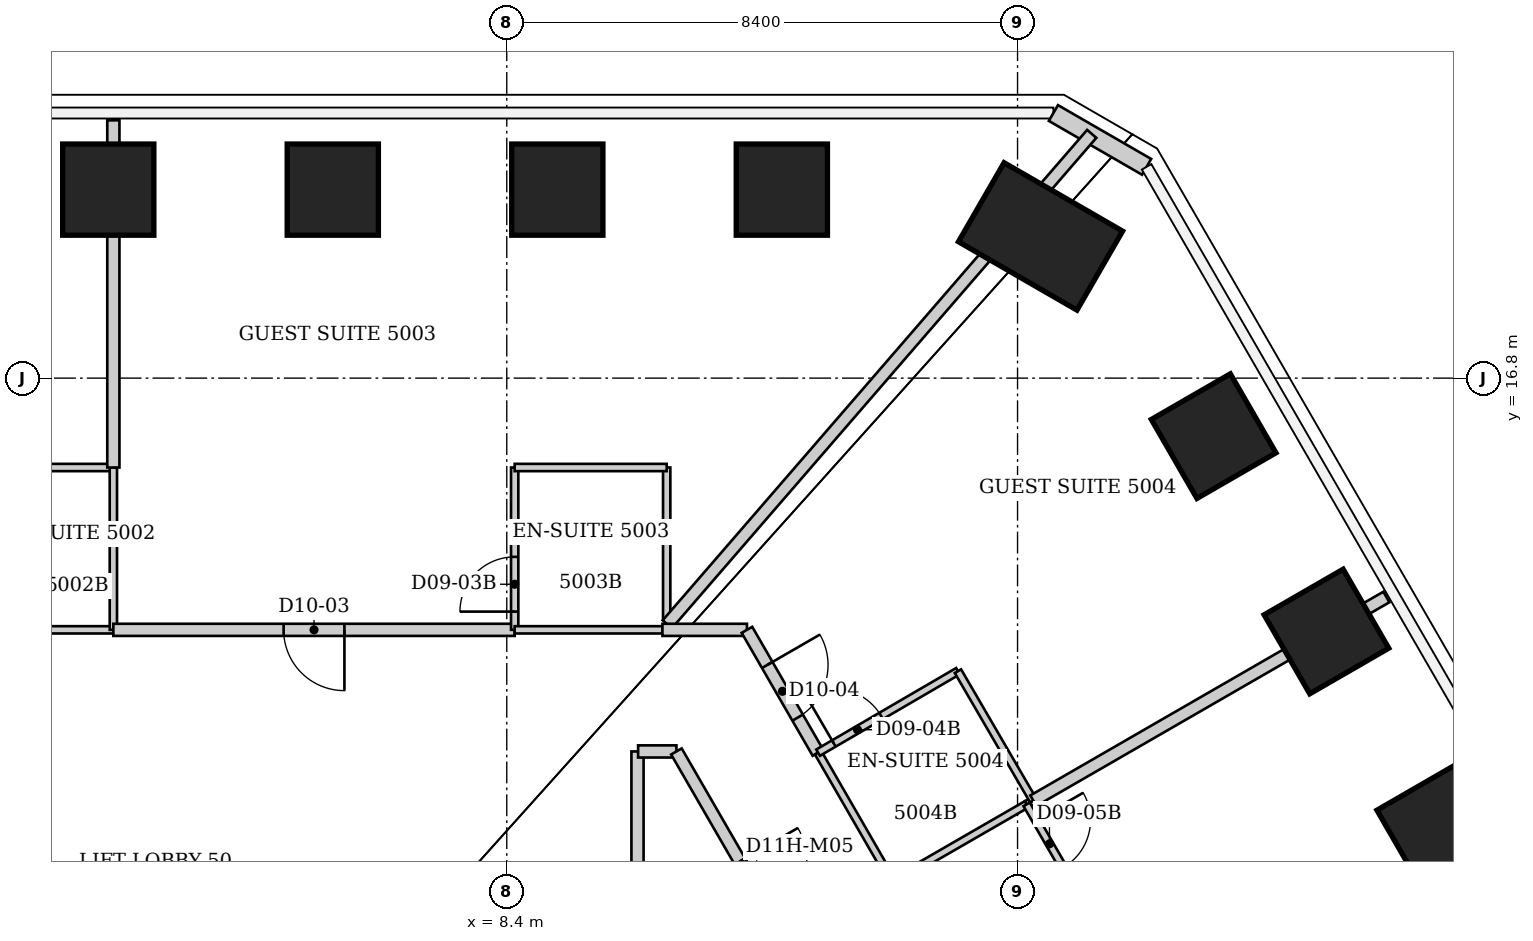
"""IFC4 building model, lengths in metres.
Left out: names, types, materials, properties, quantities, classifications, styles, units other than length and angle.
Written with IfcOpenShell. Run it as: python <this file> out.ifc"""

import sys

from ifc_helpers import new_model, si_unit, direction, frame, frame_2d, origin, origin_2d, place, context, subcontext, project, spatial, rectangle, extrude, element, fill, save


model = new_model("IFC4")
c1 = context("Model", 3, precision=1e-05, world=origin(), true_north=direction((0.0, 1.0)))
c2 = subcontext(c1, "Body", "Model", "MODEL_VIEW")
j1 = project(units=[si_unit("LENGTHUNIT", "METRE"), si_unit("PLANEANGLEUNIT", "RADIAN")], contexts=[c1])
p1 = place(None, origin())
s1 = spatial("IfcSite", under=j1, at=p1, CompositionType="ELEMENT")
p2 = place(p1, origin())
s2 = spatial("IfcBuilding", under=s1, at=p2, CompositionType="ELEMENT")
p3 = place(p2, frame((0.0, 0.0, 202.2)))
s3 = spatial("IfcBuildingStorey", under=s2, at=p3, CompositionType="ELEMENT", Elevation=202.2)
for number, where, z_axis, x_axis in (
    (1, (1.846, 19.9, 0.0), (0.0, 0.0, 1.0), (0.0, 1.0, 0.0)),
    (2, (5.539, 19.9, 0.0), (0.0, 0.0, 1.0), (0.0, 1.0, 0.0)),
    (3, (9.231, 19.9, 0.0), (0.0, 0.0, 1.0), (0.0, 1.0, 0.0)),
    (4, (12.924, 19.9, 0.0), (0.0, 0.0, 1.0), (0.0, 1.0, 0.0)),
):
    element("IfcColumn", number, at=place(p3, frame(where, z_axis=z_axis, x_axis=x_axis)), inside=s3, PredefinedType="COLUMN", context=c2, shape_type="SweptSolid", body=[
        extrude(rectangle(XDim=1.5, YDim=1.5, at=origin_2d()), origin(), (0.0, 0.0, 1.0), 3.8),
    ])
p4 = place(p3, frame((17.178, 19.131, 0.0), z_axis=(0.0, 0.0, 1.0), x_axis=(0.5, 0.866025403784, 0.0)))
e5 = element("IfcColumn", 5, at=p4, inside=s3, PredefinedType="COLUMN", context=c2, shape_type="SweptSolid", body=[
    extrude(rectangle(XDim=1.5, YDim=2.25, at=origin_2d()), origin(), (0.0, 0.0, 1.0), 3.8),
])
for number, where, z_axis, x_axis in (
    (6, (20.025, 15.846, 0.0), (0.0, 0.0, 1.0), (0.866, 0.5, 0.0)),
    (7, (21.88, 12.633, 0.0), (0.0, 0.0, 1.0), (0.866, 0.5, 0.0)),
    (8, (23.735, 9.419, 0.0), (0.0, 0.0, 1.0), (0.866, 0.5, 0.0)),
):
    element("IfcColumn", number, at=place(p3, frame(where, z_axis=z_axis, x_axis=x_axis)), inside=s3, PredefinedType="COLUMN", context=c2, shape_type="SweptSolid", body=[
        extrude(rectangle(XDim=1.5, YDim=1.5, at=origin_2d()), origin(), (0.0, 0.0, 1.0), 3.8),
    ])
p5 = place(p3, frame((17.39, 21.16, 0.0), z_axis=(0.0, 0.0, 1.0), x_axis=(0.866036293601, -0.499981137809, 0.0)))
e9 = element("IfcWall", 9, at=p5, inside=s3, PredefinedType="SOLIDWALL", context=c2, shape_type="SweptSolid", body=[
    extrude(rectangle(XDim=1.77, YDim=0.3, at=frame_2d((0.885, 0.0))), origin(), (0.0, 0.0, 1.0), 3.64),
])
for number, where, z_axis, x_axis in (
    (10, (1.93, 12.66, 0.0), (0.0, 0.0, 1.0), (-1.0, 0.0, 0.0)),
    (11, (1.93, 15.33, 0.0), (0.0, 0.0, 1.0), (-1.0, 0.0, 0.0)),
):
    element("IfcWall", number, at=place(p3, frame(where, z_axis=z_axis, x_axis=x_axis)), inside=s3, PredefinedType="PARTITIONING", context=c2, shape_type="SweptSolid", body=[
        extrude(rectangle(XDim=2.45, YDim=0.12, at=frame_2d((1.225, 0.0))), origin(), (0.0, 0.0, 1.0), 3.64),
    ])
p6 = place(p3, frame((1.93, 15.33, 0.0), z_axis=(0.0, 0.0, 1.0), x_axis=(0.0, -1.0, 0.0)))
e12 = element("IfcWall", 12, at=p6, inside=s3, PredefinedType="PARTITIONING", context=c2, shape_type="SweptSolid", body=[
    extrude(rectangle(XDim=2.67, YDim=0.12, at=frame_2d((1.335, 0.0))), origin(), (0.0, 0.0, 1.0), 3.023),
])
p7 = place(p3, frame((1.93, 21.04, 0.0), z_axis=(0.0, 0.0, 1.0), x_axis=(0.0, -1.0, 0.0)))
e13 = element("IfcWall", 13, at=p7, inside=s3, PredefinedType="PARTITIONING", context=c2, shape_type="SweptSolid", body=[
    extrude(rectangle(XDim=5.71, YDim=0.2, at=frame_2d((2.855, 0.0))), origin(), (0.0, 0.0, 1.0), 3.023),
])
p8 = place(p3, frame((8.53, 12.66, 0.0), z_axis=(0.0, 0.0, 1.0), x_axis=(-1.0, 0.0, 0.0)))
e14 = element("IfcWall", 14, at=p8, inside=s3, PredefinedType="PARTITIONING", context=c2, shape_type="SweptSolid", body=[
    extrude(rectangle(XDim=6.6, YDim=0.2, at=frame_2d((3.3, 0.0))), origin(), (0.0, 0.0, 1.0), 3.64),
])
p9 = place(p8, frame((2.8, 0.0, 0.0)))
e15 = element("IfcOpeningElement", 15, at=p9, cuts=e14, PredefinedType="OPENING", context=c2, shape_type="SweptSolid", body=[
    extrude(rectangle(XDim=1.0, YDim=2.13, at=frame_2d((0.5, 1.065))), frame((0.0, 0.1, 0.0), z_axis=(0.0, -1.0, 0.0), x_axis=(1.0, 0.0, 0.0)), (0.0, 0.0, 1.0), 0.2),
])
p10 = place(p3, frame((8.53, 15.33, 0.0), z_axis=(0.0, 0.0, 1.0), x_axis=(0.0, -1.0, 0.0)))
e16 = element("IfcWall", 16, at=p10, inside=s3, PredefinedType="PARTITIONING", context=c2, shape_type="SweptSolid", body=[
    extrude(rectangle(XDim=2.67, YDim=0.12, at=frame_2d((1.335, 0.0))), origin(), (0.0, 0.0, 1.0), 3.64),
])
p11 = place(p10, frame((1.47, 0.0, 0.0)))
e17 = element("IfcOpeningElement", 17, at=p11, cuts=e16, PredefinedType="OPENING", context=c2, shape_type="SweptSolid", body=[
    extrude(rectangle(XDim=0.9, YDim=2.03, at=frame_2d((0.45, 1.015))), frame((0.0, 0.06, 0.0), z_axis=(0.0, -1.0, 0.0), x_axis=(1.0, 0.0, 0.0)), (0.0, 0.0, 1.0), 0.12),
])
p12 = place(p3, frame((10.55, 6.09, 0.0), z_axis=(0.0, 0.0, 1.0), x_axis=(0.0, 1.0, 0.0)))
e18 = element("IfcWall", 18, at=p12, inside=s3, PredefinedType="PARTITIONING", context=c2, shape_type="SweptSolid", body=[
    extrude(rectangle(XDim=4.57, YDim=0.2, at=frame_2d((2.285, 0.0))), origin(), (0.0, 0.0, 1.0), 3.64),
])
p13 = place(p3, frame((10.56, 10.66, 0.0), z_axis=(0.0, 0.0, 1.0), x_axis=(1.0, 0.0, 0.0)))
e19 = element("IfcWall", 19, at=p13, inside=s3, PredefinedType="PARTITIONING", context=c2, shape_type="SweptSolid", body=[
    extrude(rectangle(XDim=0.63, YDim=0.2, at=frame_2d((0.315, 0.0))), origin(), (0.0, 0.0, 1.0), 3.64),
])
p14 = place(p3, frame((10.96, 12.66, 0.0), z_axis=(0.0, 0.0, 1.0), x_axis=(-1.0, 0.0, 0.0)))
e20 = element("IfcWall", 20, at=p14, inside=s3, PredefinedType="PARTITIONING", context=c2, shape_type="SweptSolid", body=[
    extrude(rectangle(XDim=2.43, YDim=0.12, at=frame_2d((1.215, 0.0))), origin(), (0.0, 0.0, 1.0), 3.64),
])
p15 = place(p3, frame((11.03, 12.83, 0.0), z_axis=(0.0, 0.0, 1.0), x_axis=(0.0, 1.0, 0.0)))
e21 = element("IfcWall", 21, at=p15, inside=s3, PredefinedType="PARTITIONING", context=c2, shape_type="SweptSolid", body=[
    extrude(rectangle(XDim=2.5, YDim=0.12, at=frame_2d((1.25, 0.0))), origin(), (0.0, 0.0, 1.0), 3.038),
])
p16 = place(p3, frame((11.03, 15.33, 0.0), z_axis=(0.0, 0.0, 1.0), x_axis=(-1.0, 0.0, 0.0)))
e22 = element("IfcWall", 22, at=p16, inside=s3, PredefinedType="PARTITIONING", context=c2, shape_type="SweptSolid", body=[
    extrude(rectangle(XDim=2.5, YDim=0.12, at=frame_2d((1.25, 0.0))), origin(), (0.0, 0.0, 1.0), 3.64),
])
p17 = place(p3, frame((11.04, 12.751, 0.0), z_axis=(0.0, 0.0, 1.0), x_axis=(0.654384042683, 0.756162366613, 0.0)))
e23 = element("IfcWall", 23, at=p17, inside=s3, PredefinedType="PARTITIONING", context=c2, shape_type="SweptSolid", body=[
    extrude(rectangle(XDim=10.667, YDim=0.2, at=frame_2d((5.333, 0.0))), origin(), (0.0, 0.0, 1.0), 3.64),
])
p18 = place(p3, frame((11.19, 10.66, 0.0), z_axis=(0.0, 0.0, 1.0), x_axis=(0.500248310865, -0.865881993967, 0.0)))
e24 = element("IfcWall", 24, at=p18, inside=s3, PredefinedType="PARTITIONING", context=c2, shape_type="SweptSolid", body=[
    extrude(rectangle(XDim=5.278, YDim=0.2, at=frame_2d((2.639, 0.0))), origin(), (0.0, 0.0, 1.0), 3.64),
])
p19 = place(p18, frame((2.089, 0.0, 0.0)))
e25 = element("IfcOpeningElement", 25, at=p19, cuts=e24, PredefinedType="OPENING", context=c2, shape_type="SweptSolid", body=[
    extrude(rectangle(XDim=1.1, YDim=2.2, at=frame_2d((0.55, 1.1))), frame((0.0, 0.1, 0.0), z_axis=(0.0, -1.0, 0.0), x_axis=(1.0, 0.0, 0.0)), (0.0, 0.0, 1.0), 0.2),
])
p20 = place(p3, frame((12.35, 12.66, 0.0), z_axis=(0.0, 0.0, 1.0), x_axis=(-1.0, 0.0, 0.0)))
e26 = element("IfcWall", 26, at=p20, inside=s3, PredefinedType="PARTITIONING", context=c2, shape_type="SweptSolid", body=[
    extrude(rectangle(XDim=1.39, YDim=0.2, at=frame_2d((0.695, 0.0))), origin(), (0.0, 0.0, 1.0), 3.64),
])
p21 = place(p3, frame((12.35, 12.66, 0.0), z_axis=(0.0, 0.0, 1.0), x_axis=(0.500120771724, -0.865955664968, 0.0)))
e27 = element("IfcWall", 27, at=p21, inside=s3, PredefinedType="PARTITIONING", context=c2, shape_type="SweptSolid", body=[
    extrude(rectangle(XDim=2.334, YDim=0.2, at=frame_2d((1.167, 0.0))), origin(), (0.0, 0.0, 1.0), 3.64),
])
p22 = place(p21, frame((0.667, 0.0, 0.0)))
e28 = element("IfcOpeningElement", 28, at=p22, cuts=e27, PredefinedType="OPENING", context=c2, shape_type="SweptSolid", body=[
    extrude(rectangle(XDim=1.0, YDim=2.13, at=frame_2d((0.5, 1.065))), frame((0.0, 0.1, 0.0), z_axis=(0.0, -1.0, 0.0), x_axis=(1.0, 0.0, 0.0)), (0.0, 0.0, 1.0), 0.2),
])
p23 = place(p3, frame((13.52, 10.64, 0.0), z_axis=(0.0, 0.0, 1.0), x_axis=(0.500046071023, -0.865998803033, 0.0)))
e29 = element("IfcWall", 29, at=p23, inside=s3, PredefinedType="PARTITIONING", context=c2, shape_type="SweptSolid", body=[
    extrude(rectangle(XDim=2.46, YDim=0.12, at=frame_2d((1.23, 0.0))), origin(), (0.0, 0.0, 1.0), 3.64),
])
p24 = place(p3, frame((14.87, 8.59, 0.0), z_axis=(0.0, 0.0, 1.0), x_axis=(0.866177122335, 0.499737123639, 0.0)))
e30 = element("IfcWall", 30, at=p24, inside=s3, PredefinedType="PARTITIONING", context=c2, shape_type="SweptSolid", body=[
    extrude(rectangle(XDim=2.401, YDim=0.12, at=frame_2d((1.201, 0.0))), origin(), (0.0, 0.0, 1.0), 2.878),
])
p25 = place(p3, frame((15.82, 11.98, 0.0), z_axis=(0.0, 0.0, 1.0), x_axis=(-0.864041571379, -0.503420463359, 0.0)))
e31 = element("IfcWall", 31, at=p25, inside=s3, PredefinedType="PARTITIONING", context=c2, shape_type="SweptSolid", body=[
    extrude(rectangle(XDim=2.662, YDim=0.12, at=frame_2d((1.331, 0.0))), origin(), (0.0, 0.0, 1.0), 3.64),
])
p26 = place(p25, frame((1.462, 0.0, 0.0)))
e32 = element("IfcOpeningElement", 32, at=p26, cuts=e31, PredefinedType="OPENING", context=c2, shape_type="SweptSolid", body=[
    extrude(rectangle(XDim=0.9, YDim=2.03, at=frame_2d((0.45, 1.015))), frame((0.0, 0.06, 0.0), z_axis=(0.0, -1.0, 0.0), x_axis=(1.0, 0.0, 0.0)), (0.0, 0.0, 1.0), 0.12),
])
p27 = place(p3, frame((16.95, 9.79, 0.0), z_axis=(0.0, 0.0, 1.0), x_axis=(0.877895572914, 0.478852130681, 0.0)))
e33 = element("IfcWall", 33, at=p27, inside=s3, PredefinedType="PARTITIONING", context=c2, shape_type="SweptSolid", body=[
    extrude(rectangle(XDim=0.125, YDim=0.12, at=frame_2d((0.063, 0.0))), origin(), (0.0, 0.0, 1.0), 3.64),
])
p28 = place(p3, frame((17.06, 9.85, 0.0), z_axis=(0.0, 0.0, 1.0), x_axis=(-0.503131731744, 0.864209731785, 0.0)))
e34 = element("IfcWall", 34, at=p28, inside=s3, PredefinedType="PARTITIONING", context=c2, shape_type="SweptSolid", body=[
    extrude(rectangle(XDim=2.465, YDim=0.12, at=frame_2d((1.232, 0.0))), origin(), (0.0, 0.0, 1.0), 3.64),
])
p29 = place(p3, frame((17.06, 9.85, 0.0), z_axis=(0.0, 0.0, 1.0), x_axis=(0.866166787958, 0.499755035431, 0.0)))
e35 = element("IfcWall", 35, at=p29, inside=s3, PredefinedType="PARTITIONING", context=c2, shape_type="SweptSolid", body=[
    extrude(rectangle(XDim=6.703, YDim=0.2, at=frame_2d((3.352, 0.0))), origin(), (0.0, 0.0, 1.0), 2.878),
])
p30 = place(p3, frame((18.25, 7.54, 0.0), z_axis=(0.0, 0.0, 1.0), x_axis=(-0.500291685314, 0.865856933682, 0.0)))
e36 = element("IfcWall", 36, at=p30, inside=s3, PredefinedType="PARTITIONING", context=c2, shape_type="SweptSolid", body=[
    extrude(rectangle(XDim=2.599, YDim=0.12, at=frame_2d((1.299, 0.0))), origin(), (0.0, 0.0, 1.0), 3.64),
])
p31 = place(p30, frame((1.399, 0.0, 0.0)))
e37 = element("IfcOpeningElement", 37, at=p31, cuts=e36, PredefinedType="OPENING", context=c2, shape_type="SweptSolid", body=[
    extrude(rectangle(XDim=0.9, YDim=2.03, at=frame_2d((0.45, 1.015))), frame((0.0, 0.06, 0.0), z_axis=(0.0, -1.0, 0.0), x_axis=(1.0, 0.0, 0.0)), (0.0, 0.0, 1.0), 0.12),
])
p32 = place(p9, origin())
e38 = element("IfcDoor", 38, at=p32, inside=s3, OperationType="SINGLE_SWING_LEFT", PredefinedType="DOOR", context=c2, shape_type="SweptSolid", body=[
    extrude(rectangle(XDim=1.0, YDim=2.13, at=frame_2d((0.5, 1.065))), frame((0.0, 0.025, 0.0), z_axis=(0.0, -1.0, 0.0), x_axis=(1.0, 0.0, 0.0)), (0.0, 0.0, 1.0), 0.05),
])
fill(e15, e38)
p33 = place(p11, origin())
e39 = element("IfcDoor", 39, at=p33, inside=s3, OperationType="SINGLE_SWING_RIGHT", PredefinedType="DOOR", context=c2, shape_type="SweptSolid", body=[
    extrude(rectangle(XDim=0.9, YDim=2.03, at=frame_2d((0.45, 1.015))), frame((0.0, 0.025, 0.0), z_axis=(0.0, -1.0, 0.0), x_axis=(1.0, 0.0, 0.0)), (0.0, 0.0, 1.0), 0.05),
])
fill(e17, e39)
p34 = place(p22, origin())
e40 = element("IfcDoor", 40, at=p34, inside=s3, OperationType="SINGLE_SWING_LEFT", PredefinedType="DOOR", context=c2, shape_type="SweptSolid", body=[
    extrude(rectangle(XDim=1.0, YDim=2.13, at=frame_2d((0.5, 1.065))), frame((0.0, 0.025, 0.0), z_axis=(0.0, -1.0, 0.0), x_axis=(1.0, 0.0, 0.0)), (0.0, 0.0, 1.0), 0.05),
])
fill(e28, e40)
p35 = place(p26, origin())
e41 = element("IfcDoor", 41, at=p35, inside=s3, OperationType="SINGLE_SWING_RIGHT", PredefinedType="DOOR", context=c2, shape_type="SweptSolid", body=[
    extrude(rectangle(XDim=0.9, YDim=2.03, at=frame_2d((0.45, 1.015))), frame((0.0, 0.025, 0.0), z_axis=(0.0, -1.0, 0.0), x_axis=(1.0, 0.0, 0.0)), (0.0, 0.0, 1.0), 0.05),
])
fill(e32, e41)
p36 = place(p31, origin())
e42 = element("IfcDoor", 42, at=p36, inside=s3, OperationType="SINGLE_SWING_RIGHT", PredefinedType="DOOR", context=c2, shape_type="SweptSolid", body=[
    extrude(rectangle(XDim=0.9, YDim=2.03, at=frame_2d((0.45, 1.015))), frame((0.0, 0.025, 0.0), z_axis=(0.0, -1.0, 0.0), x_axis=(1.0, 0.0, 0.0)), (0.0, 0.0, 1.0), 0.05),
])
fill(e37, e42)
p37 = place(p19, origin())
e43 = element("IfcDoor", 43, at=p37, inside=s3, OperationType="SINGLE_SWING_LEFT", PredefinedType="DOOR", context=c2, shape_type="SweptSolid", body=[
    extrude(rectangle(XDim=1.1, YDim=2.2, at=frame_2d((0.55, 1.1))), frame((0.0, 0.025, 0.0), z_axis=(0.0, -1.0, 0.0), x_axis=(1.0, 0.0, 0.0)), (0.0, 0.0, 1.0), 0.05),
])
fill(e25, e43)
save(model, sys.argv[1])
